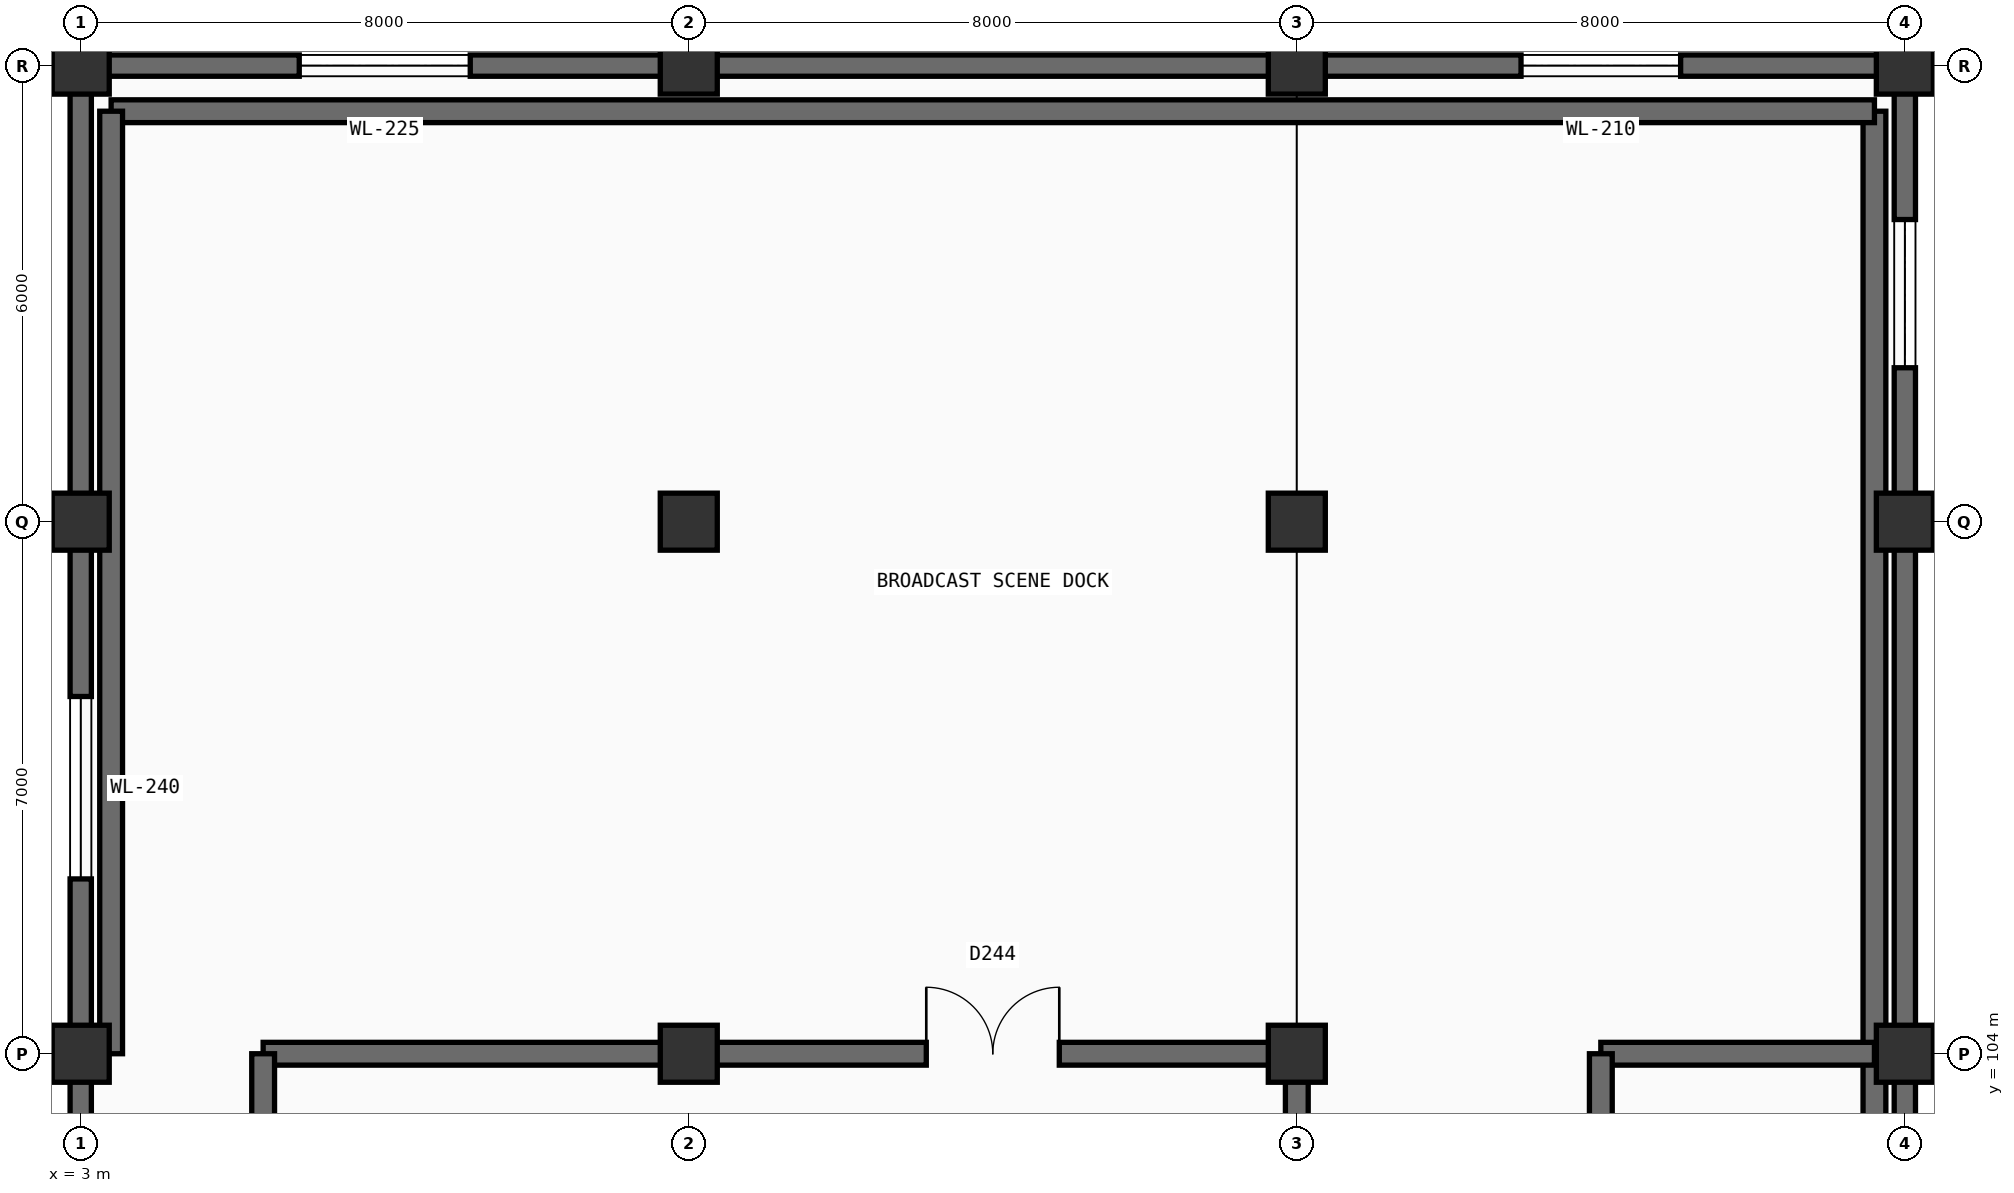
"""IFC4 building model, lengths in metres.
Left out: names, types, materials, properties, quantities, classifications, styles, units other than length and angle.
Written with IfcOpenShell. Run it as: python <this file> out.ifc"""

import sys

from ifc_helpers import new_model, si_unit, direction, frame, frame_2d, origin, origin_2d, place, context, subcontext, project, spatial, rectangle, extrude, element, fill, save


model = new_model("IFC4")
c1 = context("Model", 3, precision=1e-05, world=origin(), true_north=direction((0.0, 1.0)))
c2 = subcontext(c1, "Body", "Model", "MODEL_VIEW")
j1 = project(units=[si_unit("LENGTHUNIT", "METRE"), si_unit("PLANEANGLEUNIT", "RADIAN")], contexts=[c1])
p1 = place(None, origin())
s1 = spatial("IfcSite", under=j1, at=p1, CompositionType="ELEMENT")
p2 = place(p1, origin())
s2 = spatial("IfcBuilding", under=s1, at=p2, CompositionType="ELEMENT")
p3 = place(p2, origin())
s3 = spatial("IfcBuildingStorey", under=s2, at=p3, CompositionType="ELEMENT", Elevation=0.0)
for number, where, z_axis, x_axis in (
    (1, (3.0, 104.0, 0.0), (0.0, 0.0, 1.0), (1.0, 0.0, 0.0)),
    (2, (3.0, 111.0, 0.0), (0.0, 0.0, 1.0), (1.0, 0.0, 0.0)),
    (3, (3.0, 117.0, 0.0), (0.0, 0.0, 1.0), (1.0, 0.0, 0.0)),
    (4, (11.0, 104.0, 0.0), (0.0, 0.0, 1.0), (1.0, 0.0, 0.0)),
    (5, (11.0, 111.0, 0.0), (0.0, 0.0, 1.0), (1.0, 0.0, 0.0)),
    (6, (11.0, 117.0, 0.0), (0.0, 0.0, 1.0), (1.0, 0.0, 0.0)),
    (7, (19.0, 104.0, 0.0), (0.0, 0.0, 1.0), (1.0, 0.0, 0.0)),
    (8, (19.0, 111.0, 0.0), (0.0, 0.0, 1.0), (1.0, 0.0, 0.0)),
    (9, (19.0, 117.0, 0.0), (0.0, 0.0, 1.0), (1.0, 0.0, 0.0)),
    (10, (27.0, 104.0, 0.0), (0.0, 0.0, 1.0), (1.0, 0.0, 0.0)),
    (11, (27.0, 111.0, 0.0), (0.0, 0.0, 1.0), (1.0, 0.0, 0.0)),
    (12, (27.0, 117.0, 0.0), (0.0, 0.0, 1.0), (1.0, 0.0, 0.0)),
):
    element("IfcColumn", number, at=place(p3, frame(where, z_axis=z_axis, x_axis=x_axis)), inside=s3, PredefinedType="COLUMN", context=c2, shape_type="SweptSolid", body=[
        extrude(rectangle(XDim=0.75, YDim=0.75, at=origin_2d()), origin(), (0.0, 0.0, 1.0), 5.4),
    ])
p4 = place(p3, frame((3.0, 96.0, 0.0), z_axis=(0.0, 0.0, 1.0), x_axis=(0.0, 1.0, 0.0)))
e13 = element("IfcWall", 13, at=p4, inside=s3, PredefinedType="SOLIDWALL", context=c2, shape_type="SweptSolid", body=[
    extrude(rectangle(XDim=8.0, YDim=0.28, at=frame_2d((4.0, 0.0))), origin(), (0.0, 0.0, 1.0), 5.4),
])
p5 = place(p3, frame((3.0, 104.0, 0.0), z_axis=(0.0, 0.0, 1.0), x_axis=(0.0, 1.0, 0.0)))
e14 = element("IfcWall", 14, at=p5, inside=s3, PredefinedType="SOLIDWALL", context=c2, shape_type="SweptSolid", body=[
    extrude(rectangle(XDim=7.0, YDim=0.28, at=frame_2d((3.5, 0.0))), origin(), (0.0, 0.0, 1.0), 5.4),
])
p6 = place(p5, frame((2.3, 0.0, 1.1)))
e15 = element("IfcOpeningElement", 15, at=p6, cuts=e14, PredefinedType="OPENING", context=c2, shape_type="SweptSolid", body=[
    extrude(rectangle(XDim=2.4, YDim=1.1, at=frame_2d((1.2, 0.55))), frame((0.0, 0.15, 0.0), z_axis=(0.0, -1.0, 0.0), x_axis=(1.0, 0.0, 0.0)), (0.0, 0.0, 1.0), 0.3),
])
p7 = place(p3, frame((3.0, 111.0, 0.0), z_axis=(0.0, 0.0, 1.0), x_axis=(0.0, 1.0, 0.0)))
e16 = element("IfcWall", 16, at=p7, inside=s3, PredefinedType="SOLIDWALL", context=c2, shape_type="SweptSolid", body=[
    extrude(rectangle(XDim=6.0, YDim=0.28, at=frame_2d((3.0, 0.0))), origin(), (0.0, 0.0, 1.0), 5.4),
])
p8 = place(p3, frame((3.0, 117.0, 0.0), z_axis=(0.0, 0.0, 1.0), x_axis=(1.0, 0.0, 0.0)))
e17 = element("IfcWall", 17, at=p8, inside=s3, PredefinedType="SOLIDWALL", context=c2, shape_type="SweptSolid", body=[
    extrude(rectangle(XDim=8.0, YDim=0.28, at=frame_2d((4.0, 0.0))), origin(), (0.0, 0.0, 1.0), 5.4),
])
p9 = place(p8, frame((2.875, 0.0, 1.1)))
e18 = element("IfcOpeningElement", 18, at=p9, cuts=e17, PredefinedType="OPENING", context=c2, shape_type="SweptSolid", body=[
    extrude(rectangle(XDim=2.25, YDim=1.02, at=frame_2d((1.125, 0.51))), frame((0.0, 0.15, 0.0), z_axis=(0.0, -1.0, 0.0), x_axis=(1.0, 0.0, 0.0)), (0.0, 0.0, 1.0), 0.3),
])
p10 = place(p3, frame((11.0, 117.0, 0.0), z_axis=(0.0, 0.0, 1.0), x_axis=(1.0, 0.0, 0.0)))
e19 = element("IfcWall", 19, at=p10, inside=s3, PredefinedType="SOLIDWALL", context=c2, shape_type="SweptSolid", body=[
    extrude(rectangle(XDim=8.0, YDim=0.28, at=frame_2d((4.0, 0.0))), origin(), (0.0, 0.0, 1.0), 5.4),
])
p11 = place(p3, frame((19.0, 117.0, 0.0), z_axis=(0.0, 0.0, 1.0), x_axis=(1.0, 0.0, 0.0)))
e20 = element("IfcWall", 20, at=p11, inside=s3, PredefinedType="SOLIDWALL", context=c2, shape_type="SweptSolid", body=[
    extrude(rectangle(XDim=8.0, YDim=0.28, at=frame_2d((4.0, 0.0))), origin(), (0.0, 0.0, 1.0), 5.4),
])
p12 = place(p11, frame((2.95, 0.0, 1.1)))
e21 = element("IfcOpeningElement", 21, at=p12, cuts=e20, PredefinedType="OPENING", context=c2, shape_type="SweptSolid", body=[
    extrude(rectangle(XDim=2.1, YDim=0.95, at=frame_2d((1.05, 0.475))), frame((0.0, 0.15, 0.0), z_axis=(0.0, -1.0, 0.0), x_axis=(1.0, 0.0, 0.0)), (0.0, 0.0, 1.0), 0.3),
])
p13 = place(p3, frame((27.0, 117.0, 0.0), z_axis=(0.0, 0.0, 1.0), x_axis=(0.0, -1.0, 0.0)))
e22 = element("IfcWall", 22, at=p13, inside=s3, PredefinedType="SOLIDWALL", context=c2, shape_type="SweptSolid", body=[
    extrude(rectangle(XDim=6.0, YDim=0.28, at=frame_2d((3.0, 0.0))), origin(), (0.0, 0.0, 1.0), 5.4),
])
p14 = place(p13, frame((2.025, 0.0, 1.1)))
e23 = element("IfcOpeningElement", 23, at=p14, cuts=e22, PredefinedType="OPENING", context=c2, shape_type="SweptSolid", body=[
    extrude(rectangle(XDim=1.95, YDim=0.9, at=frame_2d((0.975, 0.45))), frame((0.0, 0.15, 0.0), z_axis=(0.0, -1.0, 0.0), x_axis=(1.0, 0.0, 0.0)), (0.0, 0.0, 1.0), 0.3),
])
p15 = place(p3, frame((27.0, 111.0, 0.0), z_axis=(0.0, 0.0, 1.0), x_axis=(0.0, -1.0, 0.0)))
e24 = element("IfcWall", 24, at=p15, inside=s3, PredefinedType="SOLIDWALL", context=c2, shape_type="SweptSolid", body=[
    extrude(rectangle(XDim=7.0, YDim=0.28, at=frame_2d((3.5, 0.0))), origin(), (0.0, 0.0, 1.0), 5.4),
])
p16 = place(p3, frame((27.0, 104.0, 0.0), z_axis=(0.0, 0.0, 1.0), x_axis=(0.0, -1.0, 0.0)))
e25 = element("IfcWall", 25, at=p16, inside=s3, PredefinedType="SOLIDWALL", context=c2, shape_type="SweptSolid", body=[
    extrude(rectangle(XDim=8.0, YDim=0.28, at=frame_2d((4.0, 0.0))), origin(), (0.0, 0.0, 1.0), 5.4),
])
p17 = place(p16, frame((3.1, 0.0, 1.1)))
e26 = element("IfcOpeningElement", 26, at=p17, cuts=e25, PredefinedType="OPENING", context=c2, shape_type="SweptSolid", body=[
    extrude(rectangle(XDim=1.8, YDim=0.85, at=frame_2d((0.9, 0.425))), frame((0.0, 0.15, 0.0), z_axis=(0.0, -1.0, 0.0), x_axis=(1.0, 0.0, 0.0)), (0.0, 0.0, 1.0), 0.3),
])
p18 = place(p3, frame((19.0, 77.4, 0.0), z_axis=(0.0, 0.0, 1.0), x_axis=(0.0, 1.0, 0.0)))
e27 = element("IfcWall", 27, at=p18, inside=s3, PredefinedType="SHEAR", context=c2, shape_type="SweptSolid", body=[
    extrude(rectangle(XDim=26.6, YDim=0.3, at=frame_2d((13.3, 0.0))), origin(), (0.0, 0.0, 1.0), 5.1),
])
p19 = place(p18, frame((13.578, 0.0, 0.0)))
e28 = element("IfcOpeningElement", 28, at=p19, cuts=e27, PredefinedType="OPENING", context=c2, shape_type="SweptSolid", body=[
    extrude(rectangle(XDim=1.85, YDim=2.25, at=frame_2d((0.925, 1.125))), frame((0.0, 0.16, 0.0), z_axis=(0.0, -1.0, 0.0), x_axis=(1.0, 0.0, 0.0)), (0.0, 0.0, 1.0), 0.32),
])
p20 = place(p3, frame((5.4, 104.0, 0.0), z_axis=(0.0, 0.0, 1.0), x_axis=(1.0, 0.0, 0.0)))
e29 = element("IfcWall", 29, at=p20, inside=s3, PredefinedType="SHEAR", context=c2, shape_type="SweptSolid", body=[
    extrude(rectangle(XDim=13.6, YDim=0.3, at=frame_2d((6.8, 0.0))), origin(), (0.0, 0.0, 1.0), 5.1),
])
p21 = place(p20, frame((8.725, 0.0, 0.0)))
e30 = element("IfcOpeningElement", 30, at=p21, cuts=e29, PredefinedType="OPENING", context=c2, shape_type="SweptSolid", body=[
    extrude(rectangle(XDim=1.75, YDim=2.28, at=frame_2d((0.875, 1.14))), frame((0.0, 0.16, 0.0), z_axis=(0.0, -1.0, 0.0), x_axis=(1.0, 0.0, 0.0)), (0.0, 0.0, 1.0), 0.32),
])
p22 = place(p3, frame((5.4, 77.4, 0.0), z_axis=(0.0, 0.0, 1.0), x_axis=(0.0, 1.0, 0.0)))
e31 = element("IfcWall", 31, at=p22, inside=s3, PredefinedType="SHEAR", context=c2, shape_type="SweptSolid", body=[
    extrude(rectangle(XDim=26.6, YDim=0.3, at=frame_2d((13.3, 0.0))), origin(), (0.0, 0.0, 1.0), 5.1),
])
p23 = place(p3, frame((26.6, 104.0, 0.0), z_axis=(0.0, 0.0, 1.0), x_axis=(0.0, 1.0, 0.0)))
e32 = element("IfcWall", 32, at=p23, inside=s3, PredefinedType="SHEAR", context=c2, shape_type="SweptSolid", body=[
    extrude(rectangle(XDim=12.4, YDim=0.3, at=frame_2d((6.2, 0.0))), origin(), (0.0, 0.0, 1.0), 5.1),
])
p24 = place(p3, frame((3.4, 116.4, 0.0), z_axis=(0.0, 0.0, 1.0), x_axis=(1.0, 0.0, 0.0)))
e33 = element("IfcWall", 33, at=p24, inside=s3, PredefinedType="SHEAR", context=c2, shape_type="SweptSolid", body=[
    extrude(rectangle(XDim=23.2, YDim=0.3, at=frame_2d((11.6, 0.0))), origin(), (0.0, 0.0, 1.0), 5.1),
])
p25 = place(p3, frame((3.4, 104.0, 0.0), z_axis=(0.0, 0.0, 1.0), x_axis=(0.0, 1.0, 0.0)))
e34 = element("IfcWall", 34, at=p25, inside=s3, PredefinedType="SHEAR", context=c2, shape_type="SweptSolid", body=[
    extrude(rectangle(XDim=12.4, YDim=0.3, at=frame_2d((6.2, 0.0))), origin(), (0.0, 0.0, 1.0), 5.1),
])
p26 = place(p3, frame((26.6, 77.4, 0.0), z_axis=(0.0, 0.0, 1.0), x_axis=(0.0, 1.0, 0.0)))
e35 = element("IfcWall", 35, at=p26, inside=s3, PredefinedType="SHEAR", context=c2, shape_type="SweptSolid", body=[
    extrude(rectangle(XDim=26.6, YDim=0.3, at=frame_2d((13.3, 0.0))), origin(), (0.0, 0.0, 1.0), 5.1),
])
p27 = place(p3, frame((23.0, 104.0, 0.0), z_axis=(0.0, 0.0, 1.0), x_axis=(1.0, 0.0, 0.0)))
e36 = element("IfcWall", 36, at=p27, inside=s3, PredefinedType="SHEAR", context=c2, shape_type="SweptSolid", body=[
    extrude(rectangle(XDim=3.6, YDim=0.3, at=frame_2d((1.8, 0.0))), origin(), (0.0, 0.0, 1.0), 5.1),
])
p28 = place(p3, frame((23.0, 77.4, 0.0), z_axis=(0.0, 0.0, 1.0), x_axis=(0.0, 1.0, 0.0)))
e37 = element("IfcWall", 37, at=p28, inside=s3, PredefinedType="SHEAR", context=c2, shape_type="SweptSolid", body=[
    extrude(rectangle(XDim=26.6, YDim=0.3, at=frame_2d((13.3, 0.0))), origin(), (0.0, 0.0, 1.0), 5.1),
])
p29 = place(p28, frame((13.783, 0.0, 0.0)))
e38 = element("IfcOpeningElement", 38, at=p29, cuts=e37, PredefinedType="OPENING", context=c2, shape_type="SweptSolid", body=[
    extrude(rectangle(XDim=1.65, YDim=2.25, at=frame_2d((0.825, 1.125))), frame((0.0, 0.16, 0.0), z_axis=(0.0, -1.0, 0.0), x_axis=(1.0, 0.0, 0.0)), (0.0, 0.0, 1.0), 0.32),
])
p30 = place(p6, origin())
e39 = element("IfcWindow", 39, at=p30, inside=s3, PartitioningType="SINGLE_PANEL", PredefinedType="WINDOW", context=c2, shape_type="SweptSolid", body=[
    extrude(rectangle(XDim=2.4, YDim=1.1, at=frame_2d((1.2, 0.55))), frame((0.0, 0.03, 0.0), z_axis=(0.0, -1.0, 0.0), x_axis=(1.0, 0.0, 0.0)), (0.0, 0.0, 1.0), 0.06),
])
fill(e15, e39)
p31 = place(p9, origin())
e40 = element("IfcWindow", 40, at=p31, inside=s3, PartitioningType="SINGLE_PANEL", PredefinedType="WINDOW", context=c2, shape_type="SweptSolid", body=[
    extrude(rectangle(XDim=2.25, YDim=1.02, at=frame_2d((1.125, 0.51))), frame((0.0, 0.03, 0.0), z_axis=(0.0, -1.0, 0.0), x_axis=(1.0, 0.0, 0.0)), (0.0, 0.0, 1.0), 0.06),
])
fill(e18, e40)
p32 = place(p12, origin())
e41 = element("IfcWindow", 41, at=p32, inside=s3, PartitioningType="SINGLE_PANEL", PredefinedType="WINDOW", context=c2, shape_type="SweptSolid", body=[
    extrude(rectangle(XDim=2.1, YDim=0.95, at=frame_2d((1.05, 0.475))), frame((0.0, 0.03, 0.0), z_axis=(0.0, -1.0, 0.0), x_axis=(1.0, 0.0, 0.0)), (0.0, 0.0, 1.0), 0.06),
])
fill(e21, e41)
p33 = place(p14, origin())
e42 = element("IfcWindow", 42, at=p33, inside=s3, PartitioningType="SINGLE_PANEL", PredefinedType="WINDOW", context=c2, shape_type="SweptSolid", body=[
    extrude(rectangle(XDim=1.95, YDim=0.9, at=frame_2d((0.975, 0.45))), frame((0.0, 0.03, 0.0), z_axis=(0.0, -1.0, 0.0), x_axis=(1.0, 0.0, 0.0)), (0.0, 0.0, 1.0), 0.06),
])
fill(e23, e42)
p34 = place(p21, origin())
e43 = element("IfcDoor", 43, at=p34, inside=s3, OperationType="DOUBLE_DOOR_SINGLE_SWING", PredefinedType="DOOR", context=c2, shape_type="SweptSolid", body=[
    extrude(rectangle(XDim=1.75, YDim=2.28, at=frame_2d((0.875, 1.14))), frame((0.0, 0.025, 0.0), z_axis=(0.0, -1.0, 0.0), x_axis=(1.0, 0.0, 0.0)), (0.0, 0.0, 1.0), 0.05),
])
fill(e30, e43)
save(model, sys.argv[1])
